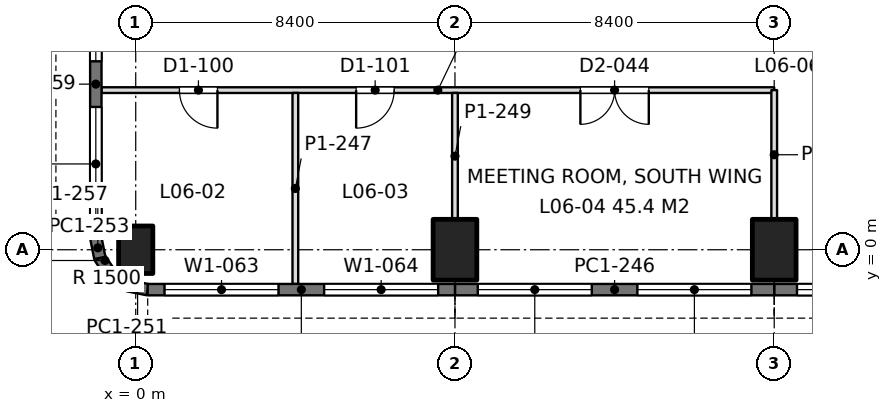
"""IFC4 building model, lengths in metres.
Left out: names, types, materials, properties, quantities, classifications, styles, units other than length and angle.
Written with IfcOpenShell. Run it as: python <this file> out.ifc"""

import sys

from ifc_helpers import new_model, si_unit, direction, frame, frame_2d, origin, origin_with_axes, origin_2d, place, context, subcontext, project, spatial, rectangle, extrude, element, fill, save


model = new_model("IFC4")
c1 = context("Model", 3, precision=1e-05, world=origin(), true_north=direction((0.0, 1.0)))
c2 = subcontext(c1, "Body", "Model", "MODEL_VIEW")
j1 = project(units=[si_unit("LENGTHUNIT", "METRE"), si_unit("PLANEANGLEUNIT", "RADIAN")], contexts=[c1])
p1 = place(None, origin())
s1 = spatial("IfcSite", under=j1, at=p1, CompositionType="ELEMENT")
p2 = place(p1, origin())
s2 = spatial("IfcBuilding", under=s1, at=p2, CompositionType="ELEMENT")
p3 = place(p2, frame((0.0, 0.0, 27.9)))
s3 = spatial("IfcBuildingStorey", under=s2, at=p3, CompositionType="ELEMENT", Elevation=27.9)
p4 = place(p3, origin_with_axes())
e1 = element("IfcColumn", 1, at=p4, inside=s3, PredefinedType="COLUMN", context=c2, shape_type="SweptSolid", body=[
    extrude(rectangle(XDim=0.9, YDim=1.25, at=origin_2d()), origin(), (0.0, 0.0, 1.0), 4.5),
])
for number, where, z_axis, x_axis in (
    (2, (8.4, 0.0, 0.0), (0.0, 0.0, 1.0), (1.0, 0.0, 0.0)),
    (3, (16.8, 0.0, 0.0), (0.0, 0.0, 1.0), (1.0, 0.0, 0.0)),
):
    element("IfcColumn", number, at=place(p3, frame(where, z_axis=z_axis, x_axis=x_axis)), inside=s3, PredefinedType="COLUMN", context=c2, shape_type="SweptSolid", body=[
        extrude(rectangle(XDim=1.15, YDim=1.6, at=origin_2d()), origin(), (0.0, 0.0, 1.0), 4.5),
    ])
p5 = place(p3, frame((25.2, -1.05, 0.0), z_axis=(0.0, 0.0, 1.0), x_axis=(-1.0, 0.0, 0.0)))
e4 = element("IfcWall", 4, at=p5, inside=s3, PredefinedType="SOLIDWALL", context=c2, shape_type="SweptSolid", body=[
    extrude(rectangle(XDim=8.4, YDim=0.3, at=frame_2d((4.2, 0.0))), origin(), (0.0, 0.0, 1.0), 4.34),
])
p6 = place(p5, frame((0.6, 0.0, 0.9)))
e5 = element("IfcOpeningElement", 5, at=p6, cuts=e4, PredefinedType="OPENING", context=c2, shape_type="SweptSolid", body=[
    extrude(rectangle(XDim=3.0, YDim=1.9, at=frame_2d((1.5, 0.95))), frame((0.0, 0.16, 0.0), z_axis=(0.0, -1.0, 0.0), x_axis=(1.0, 0.0, 0.0)), (0.0, 0.0, 1.0), 0.32),
])
p7 = place(p5, frame((4.8, 0.0, 0.9)))
e6 = element("IfcOpeningElement", 6, at=p7, cuts=e4, PredefinedType="OPENING", context=c2, shape_type="SweptSolid", body=[
    extrude(rectangle(XDim=3.0, YDim=1.9, at=frame_2d((1.5, 0.95))), frame((0.0, 0.16, 0.0), z_axis=(0.0, -1.0, 0.0), x_axis=(1.0, 0.0, 0.0)), (0.0, 0.0, 1.0), 0.32),
])
p8 = place(p3, frame((16.8, -1.05, 0.0), z_axis=(0.0, 0.0, 1.0), x_axis=(-1.0, 0.0, 0.0)))
e7 = element("IfcWall", 7, at=p8, inside=s3, PredefinedType="SOLIDWALL", context=c2, shape_type="SweptSolid", body=[
    extrude(rectangle(XDim=8.4, YDim=0.3, at=frame_2d((4.2, 0.0))), origin(), (0.0, 0.0, 1.0), 4.34),
])
p9 = place(p8, frame((0.6, 0.0, 0.9)))
e8 = element("IfcOpeningElement", 8, at=p9, cuts=e7, PredefinedType="OPENING", context=c2, shape_type="SweptSolid", body=[
    extrude(rectangle(XDim=3.0, YDim=1.9, at=frame_2d((1.5, 0.95))), frame((0.0, 0.16, 0.0), z_axis=(0.0, -1.0, 0.0), x_axis=(1.0, 0.0, 0.0)), (0.0, 0.0, 1.0), 0.32),
])
p10 = place(p8, frame((4.8, 0.0, 0.9)))
e9 = element("IfcOpeningElement", 9, at=p10, cuts=e7, PredefinedType="OPENING", context=c2, shape_type="SweptSolid", body=[
    extrude(rectangle(XDim=3.0, YDim=1.9, at=frame_2d((1.5, 0.95))), frame((0.0, 0.16, 0.0), z_axis=(0.0, -1.0, 0.0), x_axis=(1.0, 0.0, 0.0)), (0.0, 0.0, 1.0), 0.32),
])
p11 = place(p3, frame((8.4, -1.05, 0.0), z_axis=(0.0, 0.0, 1.0), x_axis=(-1.0, 0.0, 0.0)))
e10 = element("IfcWall", 10, at=p11, inside=s3, PredefinedType="SOLIDWALL", context=c2, shape_type="SweptSolid", body=[
    extrude(rectangle(XDim=8.085, YDim=0.3, at=frame_2d((4.042, 0.0))), origin(), (0.0, 0.0, 1.0), 4.34),
])
p12 = place(p11, frame((0.443, 0.0, 0.9)))
e11 = element("IfcOpeningElement", 11, at=p12, cuts=e10, PredefinedType="OPENING", context=c2, shape_type="SweptSolid", body=[
    extrude(rectangle(XDim=3.0, YDim=1.9, at=frame_2d((1.5, 0.95))), frame((0.0, 0.16, 0.0), z_axis=(0.0, -1.0, 0.0), x_axis=(1.0, 0.0, 0.0)), (0.0, 0.0, 1.0), 0.32),
])
p13 = place(p11, frame((4.643, 0.0, 0.9)))
e12 = element("IfcOpeningElement", 12, at=p13, cuts=e10, PredefinedType="OPENING", context=c2, shape_type="SweptSolid", body=[
    extrude(rectangle(XDim=3.0, YDim=1.9, at=frame_2d((1.5, 0.95))), frame((0.0, 0.16, 0.0), z_axis=(0.0, -1.0, 0.0), x_axis=(1.0, 0.0, 0.0)), (0.0, 0.0, 1.0), 0.32),
])
p14 = place(p3, frame((0.315, -1.05, 0.0), z_axis=(0.0, 0.0, 1.0), x_axis=(-0.980788534345, 0.195073962632, 0.0)))
e13 = element("IfcWall", 13, at=p14, inside=s3, PredefinedType="SOLIDWALL", context=c2, shape_type="SweptSolid", body=[
    extrude(rectangle(XDim=0.541, YDim=0.3, at=frame_2d((0.271, 0.0))), origin(), (0.0, 0.0, 1.0), 4.34),
])
for number, where, z_axis, x_axis in (
    (14, (-0.216, -0.945, 0.0), (0.0, 0.0, 1.0), (-0.831, 0.556, 0.0)),
    (15, (-0.653, -0.653, 0.0), (0.0, 0.0, 1.0), (-0.556, 0.831, 0.0)),
):
    element("IfcWall", number, at=place(p3, frame(where, z_axis=z_axis, x_axis=x_axis)), inside=s3, PredefinedType="SOLIDWALL", context=c2, shape_type="SweptSolid", body=[
        extrude(rectangle(XDim=0.526, YDim=0.3, at=frame_2d((0.263, 0.0))), origin(), (0.0, 0.0, 1.0), 4.34),
    ])
p15 = place(p3, frame((-0.945, -0.216, 0.0), z_axis=(0.0, 0.0, 1.0), x_axis=(-0.195073962632, 0.980788534345, 0.0)))
e16 = element("IfcWall", 16, at=p15, inside=s3, PredefinedType="SOLIDWALL", context=c2, shape_type="SweptSolid", body=[
    extrude(rectangle(XDim=0.541, YDim=0.3, at=frame_2d((0.271, 0.0))), origin(), (0.0, 0.0, 1.0), 4.34),
])
p16 = place(p3, frame((-1.05, 0.315, 0.0), z_axis=(0.0, 0.0, 1.0), x_axis=(0.0, 1.0, 0.0)))
e17 = element("IfcWall", 17, at=p16, inside=s3, PredefinedType="SOLIDWALL", context=c2, shape_type="SweptSolid", body=[
    extrude(rectangle(XDim=8.085, YDim=0.3, at=frame_2d((4.042, 0.0))), origin(), (0.0, 0.0, 1.0), 4.34),
])
p17 = place(p16, frame((0.443, 0.0, 0.9)))
e18 = element("IfcOpeningElement", 18, at=p17, cuts=e17, PredefinedType="OPENING", context=c2, shape_type="SweptSolid", body=[
    extrude(rectangle(XDim=3.0, YDim=1.9, at=frame_2d((1.5, 0.95))), frame((0.0, 0.16, 0.0), z_axis=(0.0, -1.0, 0.0), x_axis=(1.0, 0.0, 0.0)), (0.0, 0.0, 1.0), 0.32),
])
p18 = place(p16, frame((4.643, 0.0, 0.9)))
e19 = element("IfcOpeningElement", 19, at=p18, cuts=e17, PredefinedType="OPENING", context=c2, shape_type="SweptSolid", body=[
    extrude(rectangle(XDim=3.0, YDim=1.9, at=frame_2d((1.5, 0.95))), frame((0.0, 0.16, 0.0), z_axis=(0.0, -1.0, 0.0), x_axis=(1.0, 0.0, 0.0)), (0.0, 0.0, 1.0), 0.32),
])
p19 = place(p3, frame((-0.902, 4.2, 0.0), z_axis=(0.0, 0.0, 1.0), x_axis=(1.0, 0.0, 0.0)))
e20 = element("IfcWall", 20, at=p19, inside=s3, PredefinedType="PARTITIONING", context=c2, shape_type="SweptSolid", body=[
    extrude(rectangle(XDim=17.702, YDim=0.15, at=frame_2d((8.851, 0.0))), origin(), (0.0, 0.0, 1.0), 3.74),
])
p20 = place(p19, frame((2.052, 0.0, 0.0)))
e21 = element("IfcOpeningElement", 21, at=p20, cuts=e20, PredefinedType="OPENING", context=c2, shape_type="SweptSolid", body=[
    extrude(rectangle(XDim=1.0, YDim=2.2, at=frame_2d((0.5, 1.1))), frame((0.0, 0.085, 0.0), z_axis=(0.0, -1.0, 0.0), x_axis=(1.0, 0.0, 0.0)), (0.0, 0.0, 1.0), 0.17),
])
p21 = place(p19, frame((6.702, 0.0, 0.0)))
e22 = element("IfcOpeningElement", 22, at=p21, cuts=e20, PredefinedType="OPENING", context=c2, shape_type="SweptSolid", body=[
    extrude(rectangle(XDim=1.0, YDim=2.2, at=frame_2d((0.5, 1.1))), frame((0.0, 0.085, 0.0), z_axis=(0.0, -1.0, 0.0), x_axis=(1.0, 0.0, 0.0)), (0.0, 0.0, 1.0), 0.17),
])
p22 = place(p19, frame((12.602, 0.0, 0.0)))
e23 = element("IfcOpeningElement", 23, at=p22, cuts=e20, PredefinedType="OPENING", context=c2, shape_type="SweptSolid", body=[
    extrude(rectangle(XDim=1.8, YDim=2.2, at=frame_2d((0.9, 1.1))), frame((0.0, 0.085, 0.0), z_axis=(0.0, -1.0, 0.0), x_axis=(1.0, 0.0, 0.0)), (0.0, 0.0, 1.0), 0.17),
])
p23 = place(p3, frame((4.2, -0.902, 0.0), z_axis=(0.0, 0.0, 1.0), x_axis=(0.0, 1.0, 0.0)))
e24 = element("IfcWall", 24, at=p23, inside=s3, PredefinedType="PARTITIONING", context=c2, shape_type="SweptSolid", body=[
    extrude(rectangle(XDim=5.028, YDim=0.15, at=frame_2d((2.514, 0.0))), origin(), (0.0, 0.0, 1.0), 3.84),
])
p24 = place(p3, frame((8.4, 0.799, 0.0), z_axis=(0.0, 0.0, 1.0), x_axis=(0.0, 1.0, 0.0)))
e25 = element("IfcWall", 25, at=p24, inside=s3, PredefinedType="PARTITIONING", context=c2, shape_type="SweptSolid", body=[
    extrude(rectangle(XDim=3.327, YDim=0.15, at=frame_2d((1.664, 0.0))), origin(), (0.0, 0.0, 1.0), 3.74),
])
p25 = place(p3, frame((16.8, 0.799, 0.0), z_axis=(0.0, 0.0, 1.0), x_axis=(0.0, 1.0, 0.0)))
e26 = element("IfcWall", 26, at=p25, inside=s3, PredefinedType="PARTITIONING", context=c2, shape_type="SweptSolid", body=[
    extrude(rectangle(XDim=3.401, YDim=0.15, at=frame_2d((1.7, 0.0))), origin(), (0.0, 0.0, 1.0), 3.74),
])
p26 = place(p7, origin())
e27 = element("IfcWindow", 27, at=p26, inside=s3, PartitioningType="SINGLE_PANEL", PredefinedType="WINDOW", context=c2, shape_type="SweptSolid", body=[
    extrude(rectangle(XDim=3.0, YDim=1.9, at=frame_2d((1.5, 0.95))), frame((0.0, 0.03, 0.0), z_axis=(0.0, -1.0, 0.0), x_axis=(1.0, 0.0, 0.0)), (0.0, 0.0, 1.0), 0.06),
])
fill(e6, e27)
p27 = place(p9, origin())
e28 = element("IfcWindow", 28, at=p27, inside=s3, PartitioningType="SINGLE_PANEL", PredefinedType="WINDOW", context=c2, shape_type="SweptSolid", body=[
    extrude(rectangle(XDim=3.0, YDim=1.9, at=frame_2d((1.5, 0.95))), frame((0.0, 0.03, 0.0), z_axis=(0.0, -1.0, 0.0), x_axis=(1.0, 0.0, 0.0)), (0.0, 0.0, 1.0), 0.06),
])
fill(e8, e28)
p28 = place(p10, origin())
e29 = element("IfcWindow", 29, at=p28, inside=s3, PartitioningType="SINGLE_PANEL", PredefinedType="WINDOW", context=c2, shape_type="SweptSolid", body=[
    extrude(rectangle(XDim=3.0, YDim=1.9, at=frame_2d((1.5, 0.95))), frame((0.0, 0.03, 0.0), z_axis=(0.0, -1.0, 0.0), x_axis=(1.0, 0.0, 0.0)), (0.0, 0.0, 1.0), 0.06),
])
fill(e9, e29)
p29 = place(p12, origin())
e30 = element("IfcWindow", 30, at=p29, inside=s3, PartitioningType="SINGLE_PANEL", PredefinedType="WINDOW", context=c2, shape_type="SweptSolid", body=[
    extrude(rectangle(XDim=3.0, YDim=1.9, at=frame_2d((1.5, 0.95))), frame((0.0, 0.03, 0.0), z_axis=(0.0, -1.0, 0.0), x_axis=(1.0, 0.0, 0.0)), (0.0, 0.0, 1.0), 0.06),
])
fill(e11, e30)
p30 = place(p13, origin())
e31 = element("IfcWindow", 31, at=p30, inside=s3, PartitioningType="SINGLE_PANEL", PredefinedType="WINDOW", context=c2, shape_type="SweptSolid", body=[
    extrude(rectangle(XDim=3.0, YDim=1.9, at=frame_2d((1.5, 0.95))), frame((0.0, 0.03, 0.0), z_axis=(0.0, -1.0, 0.0), x_axis=(1.0, 0.0, 0.0)), (0.0, 0.0, 1.0), 0.06),
])
fill(e12, e31)
p31 = place(p17, origin())
e32 = element("IfcWindow", 32, at=p31, inside=s3, PartitioningType="SINGLE_PANEL", PredefinedType="WINDOW", context=c2, shape_type="SweptSolid", body=[
    extrude(rectangle(XDim=3.0, YDim=1.9, at=frame_2d((1.5, 0.95))), frame((0.0, 0.03, 0.0), z_axis=(0.0, -1.0, 0.0), x_axis=(1.0, 0.0, 0.0)), (0.0, 0.0, 1.0), 0.06),
])
fill(e18, e32)
p32 = place(p18, origin())
e33 = element("IfcWindow", 33, at=p32, inside=s3, PartitioningType="SINGLE_PANEL", PredefinedType="WINDOW", context=c2, shape_type="SweptSolid", body=[
    extrude(rectangle(XDim=3.0, YDim=1.9, at=frame_2d((1.5, 0.95))), frame((0.0, 0.03, 0.0), z_axis=(0.0, -1.0, 0.0), x_axis=(1.0, 0.0, 0.0)), (0.0, 0.0, 1.0), 0.06),
])
fill(e19, e33)
p33 = place(p20, frame((1.0, 0.0, 0.0), z_axis=(0.0, 0.0, 1.0), x_axis=(-1.0, 0.0, 0.0)))
e34 = element("IfcDoor", 34, at=p33, inside=s3, OperationType="SINGLE_SWING_LEFT", PredefinedType="DOOR", context=c2, shape_type="SweptSolid", body=[
    extrude(rectangle(XDim=1.0, YDim=2.2, at=frame_2d((0.5, 1.1))), frame((0.0, 0.025, 0.0), z_axis=(0.0, -1.0, 0.0), x_axis=(1.0, 0.0, 0.0)), (0.0, 0.0, 1.0), 0.05),
])
fill(e21, e34)
p34 = place(p21, frame((1.0, 0.0, 0.0), z_axis=(0.0, 0.0, 1.0), x_axis=(-1.0, 0.0, 0.0)))
e35 = element("IfcDoor", 35, at=p34, inside=s3, OperationType="SINGLE_SWING_RIGHT", PredefinedType="DOOR", context=c2, shape_type="SweptSolid", body=[
    extrude(rectangle(XDim=1.0, YDim=2.2, at=frame_2d((0.5, 1.1))), frame((0.0, 0.025, 0.0), z_axis=(0.0, -1.0, 0.0), x_axis=(1.0, 0.0, 0.0)), (0.0, 0.0, 1.0), 0.05),
])
fill(e22, e35)
p35 = place(p22, frame((1.8, 0.0, 0.0), z_axis=(0.0, 0.0, 1.0), x_axis=(-1.0, 0.0, 0.0)))
e36 = element("IfcDoor", 36, at=p35, inside=s3, OperationType="DOUBLE_DOOR_SINGLE_SWING", PredefinedType="DOOR", context=c2, shape_type="SweptSolid", body=[
    extrude(rectangle(XDim=1.8, YDim=2.2, at=frame_2d((0.9, 1.1))), frame((0.0, 0.025, 0.0), z_axis=(0.0, -1.0, 0.0), x_axis=(1.0, 0.0, 0.0)), (0.0, 0.0, 1.0), 0.05),
])
fill(e23, e36)
save(model, sys.argv[1])
